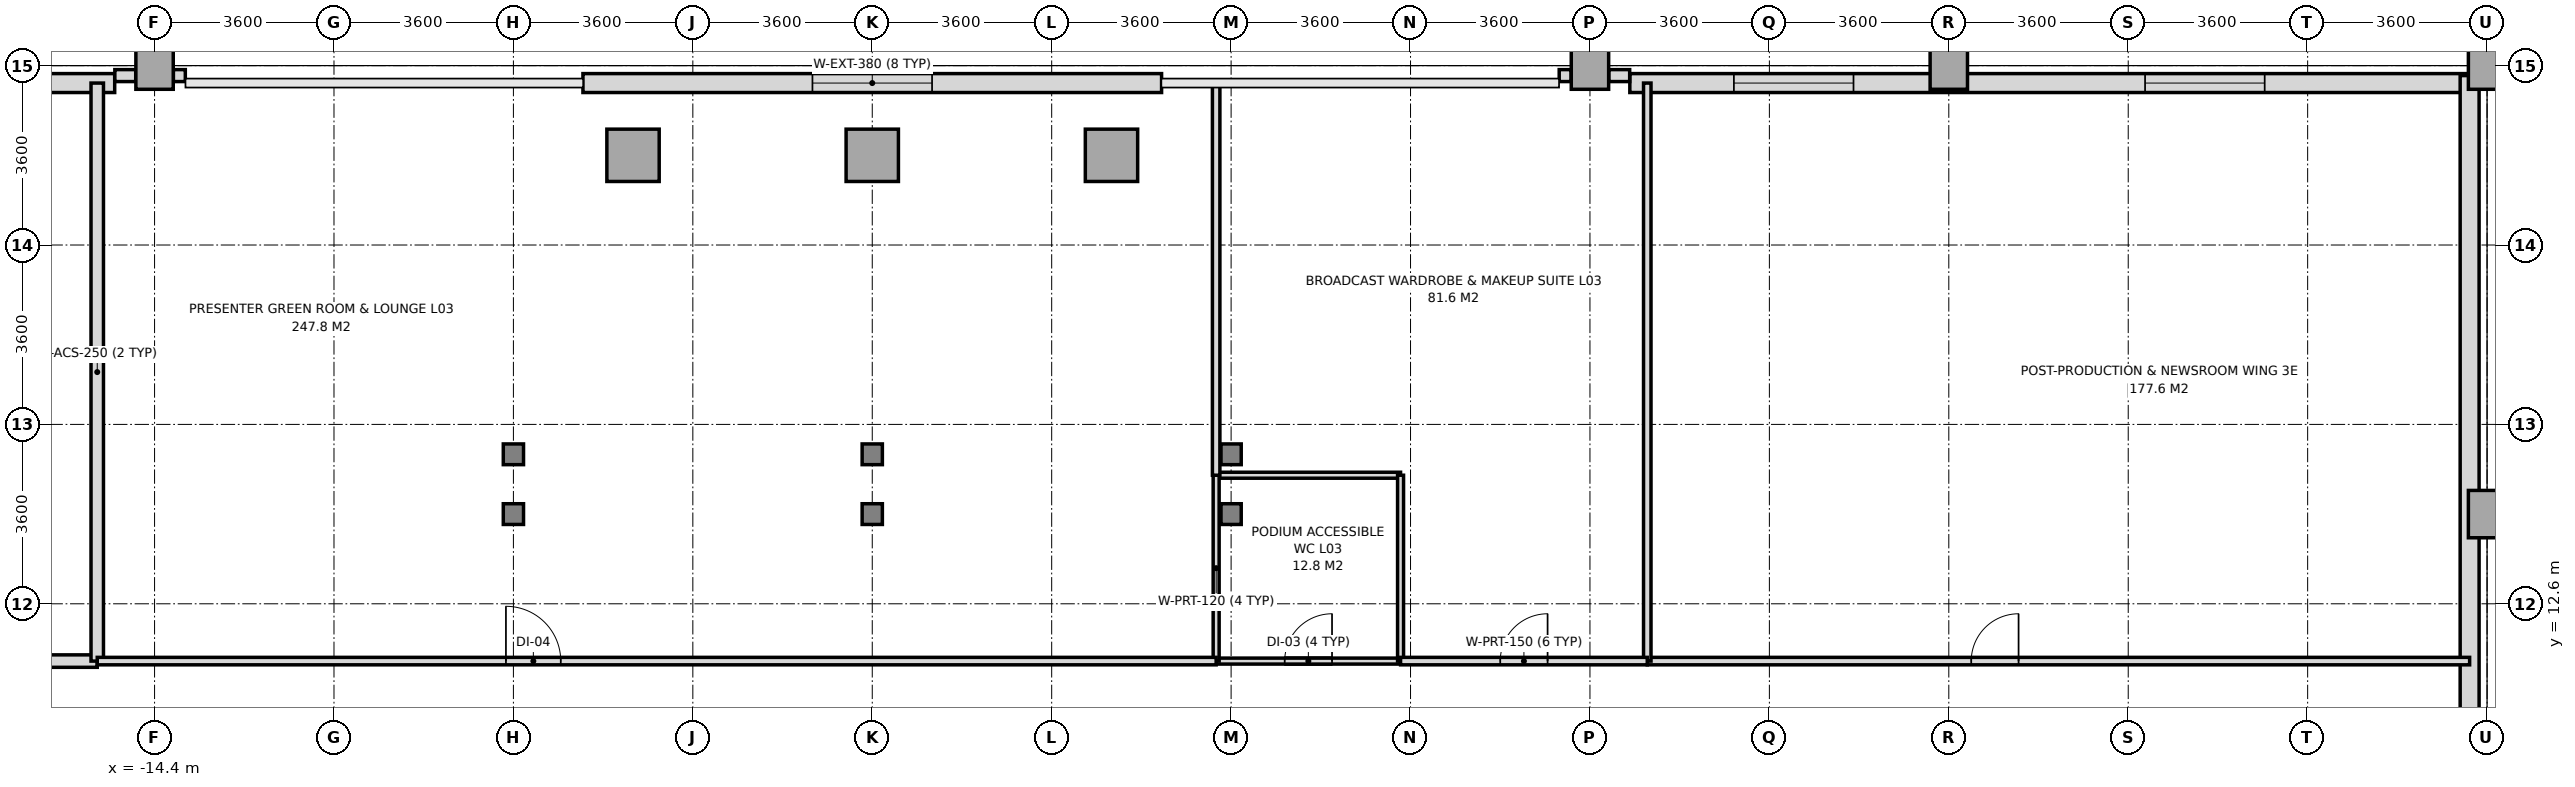
"""IFC4 building model, lengths in metres.
Left out: names, types, materials, properties, quantities, classifications, styles, units other than length and angle.
Written with IfcOpenShell. Run it as: python <this file> out.ifc"""

import sys

from ifc_helpers import new_model, si_unit, direction, frame, frame_2d, origin, origin_2d, place, context, subcontext, project, spatial, rectangle, i_section, extrude, source, transform, mapped, element, fill, save


model = new_model("IFC4")
c1 = context("Model", 3, precision=1e-05, world=origin(), true_north=direction((0.0, 1.0)))
c2 = subcontext(c1, "Body", "Model", "MODEL_VIEW")
j1 = project(units=[si_unit("LENGTHUNIT", "METRE"), si_unit("PLANEANGLEUNIT", "RADIAN")], contexts=[c1])
p1 = place(None, origin())
s1 = spatial("IfcSite", under=j1, at=p1, CompositionType="ELEMENT")
p2 = place(p1, origin())
s2 = spatial("IfcBuilding", under=s1, at=p2, CompositionType="ELEMENT")
p3 = place(p2, frame((0.0, 0.0, 15.6)))
s3 = spatial("IfcBuildingStorey", under=s2, at=p3, CompositionType="ELEMENT", Elevation=15.6)
m1 = source(origin(), c2, "Body", "SweptSolid", [
    extrude(rectangle(XDim=0.75, YDim=0.95, at=origin_2d()), origin(), (0.0, 0.0, 1.0), 4.55),
])
p4 = place(p3, frame((-14.4, 23.4, 0.0), z_axis=(0.0, 0.0, 1.0), x_axis=(1.0, 0.0, 0.0)))
e1 = element("IfcColumn", 1, at=p4, inside=s3, PredefinedType="COLUMN", context=c2, shape_type="MappedRepresentation", body=[
    mapped(m1, transform((0.0, 0.0, 0.0), x_axis=(1.0, 0.0, 0.0), y_axis=(0.0, 1.0, 0.0), z_axis=(0.0, 0.0, 1.0), scale=1.0)),
])
m2 = source(origin(), c2, "Body", "SweptSolid", [
    extrude(i_section(OverallWidth=0.406, OverallDepth=0.416, WebThickness=0.024, FlangeThickness=0.039, at=origin_2d()), origin(), (0.0, 0.0, 1.0), 4.55),
])
for number, where, z_axis, x_axis in (
    (2, (-7.2, 14.4, 0.0), (0.0, 0.0, 1.0), (1.0, 0.0, 0.0)),
    (3, (-7.2, 15.6, 0.0), (0.0, 0.0, 1.0), (1.0, 0.0, 0.0)),
):
    element("IfcColumn", number, at=place(p3, frame(where, z_axis=z_axis, x_axis=x_axis)), inside=s3, PredefinedType="COLUMN", context=c2, shape_type="MappedRepresentation", body=[
        mapped(m2, transform((0.0, 0.0, 0.0), x_axis=(1.0, 0.0, 0.0), y_axis=(0.0, 1.0, 0.0), z_axis=(0.0, 0.0, 1.0), scale=1.0)),
    ])
m3 = source(origin(), c2, "Body", "SweptSolid", [
    extrude(rectangle(XDim=1.05, YDim=1.05, at=origin_2d()), origin(), (0.0, 0.0, 1.0), 4.55),
])
p5 = place(p3, frame((-4.8, 21.6, 0.0), z_axis=(0.0, 0.0, 1.0), x_axis=(1.0, 0.0, 0.0)))
e4 = element("IfcColumn", 4, at=p5, inside=s3, PredefinedType="COLUMN", context=c2, shape_type="MappedRepresentation", body=[
    mapped(m3, transform((0.0, 0.0, 0.0), x_axis=(1.0, 0.0, 0.0), y_axis=(0.0, 1.0, 0.0), z_axis=(0.0, 0.0, 1.0), scale=1.0)),
])
for number, where, z_axis, x_axis in (
    (5, (0.0, 14.4, 0.0), (0.0, 0.0, 1.0), (1.0, 0.0, 0.0)),
    (6, (0.0, 15.6, 0.0), (0.0, 0.0, 1.0), (1.0, 0.0, 0.0)),
):
    element("IfcColumn", number, at=place(p3, frame(where, z_axis=z_axis, x_axis=x_axis)), inside=s3, PredefinedType="COLUMN", context=c2, shape_type="MappedRepresentation", body=[
        mapped(m2, transform((0.0, 0.0, 0.0), x_axis=(1.0, 0.0, 0.0), y_axis=(0.0, 1.0, 0.0), z_axis=(0.0, 0.0, 1.0), scale=1.0)),
    ])
for number, where, z_axis, x_axis in (
    (7, (0.0, 21.6, 0.0), (0.0, 0.0, 1.0), (1.0, 0.0, 0.0)),
    (8, (4.8, 21.6, 0.0), (0.0, 0.0, 1.0), (1.0, 0.0, 0.0)),
):
    element("IfcColumn", number, at=place(p3, frame(where, z_axis=z_axis, x_axis=x_axis)), inside=s3, PredefinedType="COLUMN", context=c2, shape_type="MappedRepresentation", body=[
        mapped(m3, transform((0.0, 0.0, 0.0), x_axis=(1.0, 0.0, 0.0), y_axis=(0.0, 1.0, 0.0), z_axis=(0.0, 0.0, 1.0), scale=1.0)),
    ])
for number, where, z_axis, x_axis in (
    (9, (7.2, 14.4, 0.0), (0.0, 0.0, 1.0), (1.0, 0.0, 0.0)),
    (10, (7.2, 15.6, 0.0), (0.0, 0.0, 1.0), (1.0, 0.0, 0.0)),
):
    element("IfcColumn", number, at=place(p3, frame(where, z_axis=z_axis, x_axis=x_axis)), inside=s3, PredefinedType="COLUMN", context=c2, shape_type="MappedRepresentation", body=[
        mapped(m2, transform((0.0, 0.0, 0.0), x_axis=(1.0, 0.0, 0.0), y_axis=(0.0, 1.0, 0.0), z_axis=(0.0, 0.0, 1.0), scale=1.0)),
    ])
for number, where, z_axis, x_axis in (
    (11, (14.4, 23.4, 0.0), (0.0, 0.0, 1.0), (1.0, 0.0, 0.0)),
    (12, (21.6, 23.4, 0.0), (0.0, 0.0, 1.0), (1.0, 0.0, 0.0)),
    (13, (32.4, 14.4, 0.0), (0.0, 0.0, 1.0), (1.0, 0.0, 0.0)),
    (14, (32.4, 23.4, 0.0), (0.0, 0.0, 1.0), (1.0, 0.0, 0.0)),
):
    element("IfcColumn", number, at=place(p3, frame(where, z_axis=z_axis, x_axis=x_axis)), inside=s3, PredefinedType="COLUMN", context=c2, shape_type="MappedRepresentation", body=[
        mapped(m1, transform((0.0, 0.0, 0.0), x_axis=(1.0, 0.0, 0.0), y_axis=(0.0, 1.0, 0.0), z_axis=(0.0, 0.0, 1.0), scale=1.0)),
    ])
p6 = place(p3, frame((-32.05, 23.05, 0.0), z_axis=(0.0, 0.0, 1.0), x_axis=(1.0, 0.0, 0.0)))
e15 = element("IfcWall", 15, at=p6, inside=s3, PredefinedType="SOLIDWALL", context=c2, shape_type="SweptSolid", body=[
    extrude(rectangle(XDim=16.85, YDim=0.38, at=frame_2d((8.425, 0.0))), origin(), (0.0, 0.0, 1.0), 3.8),
])
p7 = place(p6, frame((4.112, 0.0, 0.95)))
e16 = element("IfcOpeningElement", 16, at=p7, cuts=e15, PredefinedType="OPENING", context=c2, shape_type="SweptSolid", body=[
    extrude(rectangle(XDim=2.4, YDim=2.2, at=frame_2d((1.2, 1.1))), frame((0.0, 0.2, 0.0), z_axis=(0.0, -1.0, 0.0), x_axis=(1.0, 0.0, 0.0)), (0.0, 0.0, 1.0), 0.4),
])
p8 = place(p6, frame((12.362, 0.0, 0.95)))
e17 = element("IfcOpeningElement", 17, at=p8, cuts=e15, PredefinedType="OPENING", context=c2, shape_type="SweptSolid", body=[
    extrude(rectangle(XDim=2.4, YDim=2.2, at=frame_2d((1.2, 1.1))), frame((0.0, 0.2, 0.0), z_axis=(0.0, -1.0, 0.0), x_axis=(1.0, 0.0, 0.0)), (0.0, 0.0, 1.0), 0.4),
])
p9 = place(p3, frame((15.2, 23.05, 0.0), z_axis=(0.0, 0.0, 1.0), x_axis=(1.0, 0.0, 0.0)))
e18 = element("IfcWall", 18, at=p9, inside=s3, PredefinedType="SOLIDWALL", context=c2, shape_type="SweptSolid", body=[
    extrude(rectangle(XDim=16.85, YDim=0.38, at=frame_2d((8.425, 0.0))), origin(), (0.0, 0.0, 1.0), 3.8),
])
p10 = place(p9, frame((2.088, 0.0, 0.95)))
e19 = element("IfcOpeningElement", 19, at=p10, cuts=e18, PredefinedType="OPENING", context=c2, shape_type="SweptSolid", body=[
    extrude(rectangle(XDim=2.4, YDim=2.2, at=frame_2d((1.2, 1.1))), frame((0.0, 0.2, 0.0), z_axis=(0.0, -1.0, 0.0), x_axis=(1.0, 0.0, 0.0)), (0.0, 0.0, 1.0), 0.4),
])
p11 = place(p9, frame((10.338, 0.0, 0.95)))
e20 = element("IfcOpeningElement", 20, at=p11, cuts=e18, PredefinedType="OPENING", context=c2, shape_type="SweptSolid", body=[
    extrude(rectangle(XDim=2.4, YDim=2.2, at=frame_2d((1.2, 1.1))), frame((0.0, 0.2, 0.0), z_axis=(0.0, -1.0, 0.0), x_axis=(1.0, 0.0, 0.0)), (0.0, 0.0, 1.0), 0.4),
])
p12 = place(p3, frame((32.05, -18.8, 0.0), z_axis=(0.0, 0.0, 1.0), x_axis=(0.0, 1.0, 0.0)))
e21 = element("IfcWall", 21, at=p12, inside=s3, PredefinedType="SOLIDWALL", context=c2, shape_type="SweptSolid", body=[
    extrude(rectangle(XDim=42.0, YDim=0.38, at=frame_2d((21.0, 0.0))), origin(), (0.0, 0.0, 1.0), 3.8),
])
p13 = place(p12, frame((5.9, 0.0, 0.95)))
e22 = element("IfcOpeningElement", 22, at=p13, cuts=e21, PredefinedType="OPENING", context=c2, shape_type="SweptSolid", body=[
    extrude(rectangle(XDim=2.4, YDim=2.2, at=frame_2d((1.2, 1.1))), frame((0.0, 0.2, 0.0), z_axis=(0.0, -1.0, 0.0), x_axis=(1.0, 0.0, 0.0)), (0.0, 0.0, 1.0), 0.4),
])
p14 = place(p12, frame((13.1, 0.0, 0.95)))
e23 = element("IfcOpeningElement", 23, at=p14, cuts=e21, PredefinedType="OPENING", context=c2, shape_type="SweptSolid", body=[
    extrude(rectangle(XDim=2.4, YDim=2.2, at=frame_2d((1.2, 1.1))), frame((0.0, 0.2, 0.0), z_axis=(0.0, -1.0, 0.0), x_axis=(1.0, 0.0, 0.0)), (0.0, 0.0, 1.0), 0.4),
])
p15 = place(p12, frame((22.1, 0.0, 0.95)))
e24 = element("IfcOpeningElement", 24, at=p15, cuts=e21, PredefinedType="OPENING", context=c2, shape_type="SweptSolid", body=[
    extrude(rectangle(XDim=2.4, YDim=2.2, at=frame_2d((1.2, 1.1))), frame((0.0, 0.2, 0.0), z_axis=(0.0, -1.0, 0.0), x_axis=(1.0, 0.0, 0.0)), (0.0, 0.0, 1.0), 0.4),
])
p16 = place(p3, frame((-5.805, 23.05, 0.0), z_axis=(0.0, 0.0, 1.0), x_axis=(1.0, 0.0, 0.0)))
e25 = element("IfcWall", 25, at=p16, inside=s3, PredefinedType="SOLIDWALL", context=c2, shape_type="SweptSolid", body=[
    extrude(rectangle(XDim=11.61, YDim=0.38, at=frame_2d((5.805, 0.0))), origin(), (0.0, 0.0, 1.0), 4.55),
])
p17 = place(p16, frame((4.605, 0.0, 0.95)))
e26 = element("IfcOpeningElement", 26, at=p17, cuts=e25, PredefinedType="OPENING", context=c2, shape_type="SweptSolid", body=[
    extrude(rectangle(XDim=2.4, YDim=2.2, at=frame_2d((1.2, 1.1))), frame((0.0, 0.2, 0.0), z_axis=(0.0, -1.0, 0.0), x_axis=(1.0, 0.0, 0.0)), (0.0, 0.0, 1.0), 0.4),
])
p18 = place(p3, frame((-15.197, 23.2, 0.0), z_axis=(0.0, 0.0, 1.0), x_axis=(1.0, 0.0, 0.0)))
e27 = element("IfcWall", 27, at=p18, inside=s3, PredefinedType="PARAPET", context=c2, shape_type="SweptSolid", body=[
    extrude(rectangle(XDim=0.419, YDim=0.24, at=frame_2d((0.209, 0.0))), origin(), (0.0, 0.0, 1.0), 1.15),
])
for number, where, z_axis, x_axis in (
    (28, (-14.022, 23.2, 0.0), (0.0, 0.0, 1.0), (1.0, 0.0, 0.0)),
    (29, (13.783, 23.2, 0.0), (0.0, 0.0, 1.0), (1.0, 0.0, 0.0)),
):
    element("IfcWall", number, at=place(p3, frame(where, z_axis=z_axis, x_axis=x_axis)), inside=s3, PredefinedType="PARAPET", context=c2, shape_type="SweptSolid", body=[
        extrude(rectangle(XDim=0.239, YDim=0.24, at=frame_2d((0.12, 0.0))), origin(), (0.0, 0.0, 1.0), 1.15),
    ])
p19 = place(p3, frame((14.778, 23.2, 0.0), z_axis=(0.0, 0.0, 1.0), x_axis=(1.0, 0.0, 0.0)))
e30 = element("IfcWall", 30, at=p19, inside=s3, PredefinedType="PARAPET", context=c2, shape_type="SweptSolid", body=[
    extrude(rectangle(XDim=0.419, YDim=0.24, at=frame_2d((0.209, 0.0))), origin(), (0.0, 0.0, 1.0), 1.15),
])
p20 = place(p3, frame((6.9, 11.45, 0.0), z_axis=(0.0, 0.0, 1.0), x_axis=(1.0, 0.0, 0.0)))
e31 = element("IfcWall", 31, at=p20, inside=s3, PredefinedType="PARTITIONING", context=c2, shape_type="SweptSolid", body=[
    extrude(rectangle(XDim=3.7, YDim=0.12, at=frame_2d((1.85, 0.0))), origin(), (0.0, 0.0, 1.0), 4.55),
])
p21 = place(p20, frame((1.375, 0.0, 0.0)))
e32 = element("IfcOpeningElement", 32, at=p21, cuts=e31, PredefinedType="OPENING", context=c2, shape_type="SweptSolid", body=[
    extrude(rectangle(XDim=0.95, YDim=2.15, at=frame_2d((0.475, 1.075))), frame((0.0, 0.07, 0.0), z_axis=(0.0, -1.0, 0.0), x_axis=(1.0, 0.0, 0.0)), (0.0, 0.0, 1.0), 0.14),
])
p22 = place(p3, frame((6.9, 15.18, 0.0), z_axis=(0.0, 0.0, 1.0), x_axis=(1.0, 0.0, 0.0)))
e33 = element("IfcWall", 33, at=p22, inside=s3, PredefinedType="PARTITIONING", context=c2, shape_type="SweptSolid", body=[
    extrude(rectangle(XDim=3.7, YDim=0.12, at=frame_2d((1.85, 0.0))), origin(), (0.0, 0.0, 1.0), 3.2),
])
p23 = place(p3, frame((6.9, 11.45, 0.0), z_axis=(0.0, 0.0, 1.0), x_axis=(0.0, 1.0, 0.0)))
e34 = element("IfcWall", 34, at=p23, inside=s3, PredefinedType="PARTITIONING", context=c2, shape_type="SweptSolid", body=[
    extrude(rectangle(XDim=3.73, YDim=0.12, at=frame_2d((1.865, 0.0))), origin(), (0.0, 0.0, 1.0), 3.2),
])
p24 = place(p3, frame((10.6, 11.45, 0.0), z_axis=(0.0, 0.0, 1.0), x_axis=(0.0, 1.0, 0.0)))
e35 = element("IfcWall", 35, at=p24, inside=s3, PredefinedType="PARTITIONING", context=c2, shape_type="SweptSolid", body=[
    extrude(rectangle(XDim=3.73, YDim=0.12, at=frame_2d((1.865, 0.0))), origin(), (0.0, 0.0, 1.0), 4.55),
])
p25 = place(p3, frame((-32.05, 11.45, 0.0), z_axis=(0.0, 0.0, 1.0), x_axis=(1.0, 0.0, 0.0)))
e36 = element("IfcWall", 36, at=p25, inside=s3, PredefinedType="SOLIDWALL", context=c2, shape_type="SweptSolid", body=[
    extrude(rectangle(XDim=16.5, YDim=0.25, at=frame_2d((8.25, 0.0))), origin(), (0.0, 0.0, 1.0), 4.55),
])
p26 = place(p25, frame((6.5, 0.0, 0.0)))
e37 = element("IfcOpeningElement", 37, at=p26, cuts=e36, PredefinedType="OPENING", context=c2, shape_type="SweptSolid", body=[
    extrude(rectangle(XDim=0.95, YDim=2.15, at=frame_2d((0.475, 1.075))), frame((0.0, 0.135, 0.0), z_axis=(0.0, -1.0, 0.0), x_axis=(1.0, 0.0, 0.0)), (0.0, 0.0, 1.0), 0.27),
])
p27 = place(p3, frame((-15.55, 11.45, 0.0), z_axis=(0.0, 0.0, 1.0), x_axis=(0.0, 1.0, 0.0)))
e38 = element("IfcWall", 38, at=p27, inside=s3, PredefinedType="SOLIDWALL", context=c2, shape_type="SweptSolid", body=[
    extrude(rectangle(XDim=11.6, YDim=0.25, at=frame_2d((5.8, 0.0))), origin(), (0.0, 0.0, 1.0), 4.55),
])
p28 = place(p3, frame((15.55, 11.45, 0.0), z_axis=(0.0, 0.0, 1.0), x_axis=(1.0, 0.0, 0.0)))
e39 = element("IfcWall", 39, at=p28, inside=s3, PredefinedType="PARTITIONING", context=c2, shape_type="SweptSolid", body=[
    extrude(rectangle(XDim=16.5, YDim=0.15, at=frame_2d((8.25, 0.0))), origin(), (0.0, 0.0, 1.0), 4.55),
])
p29 = place(p28, frame((6.5, 0.0, 0.0)))
e40 = element("IfcOpeningElement", 40, at=p29, cuts=e39, PredefinedType="OPENING", context=c2, shape_type="SweptSolid", body=[
    extrude(rectangle(XDim=0.95, YDim=2.15, at=frame_2d((0.475, 1.075))), frame((0.0, 0.085, 0.0), z_axis=(0.0, -1.0, 0.0), x_axis=(1.0, 0.0, 0.0)), (0.0, 0.0, 1.0), 0.17),
])
p30 = place(p3, frame((15.55, 11.45, 0.0), z_axis=(0.0, 0.0, 1.0), x_axis=(0.0, 1.0, 0.0)))
e41 = element("IfcWall", 41, at=p30, inside=s3, PredefinedType="PARTITIONING", context=c2, shape_type="SweptSolid", body=[
    extrude(rectangle(XDim=11.6, YDim=0.15, at=frame_2d((5.8, 0.0))), origin(), (0.0, 0.0, 1.0), 4.55),
])
p31 = place(p3, frame((-15.55, 11.45, 0.0), z_axis=(0.0, 0.0, 1.0), x_axis=(1.0, 0.0, 0.0)))
e42 = element("IfcWall", 42, at=p31, inside=s3, PredefinedType="PARTITIONING", context=c2, shape_type="SweptSolid", body=[
    extrude(rectangle(XDim=22.45, YDim=0.15, at=frame_2d((11.225, 0.0))), origin(), (0.0, 0.0, 1.0), 3.95),
])
p32 = place(p31, frame((8.2, 0.0, 0.0)))
e43 = element("IfcOpeningElement", 43, at=p32, cuts=e42, PredefinedType="OPENING", context=c2, shape_type="SweptSolid", body=[
    extrude(rectangle(XDim=1.1, YDim=2.2, at=frame_2d((0.55, 1.1))), frame((0.0, 0.085, 0.0), z_axis=(0.0, -1.0, 0.0), x_axis=(1.0, 0.0, 0.0)), (0.0, 0.0, 1.0), 0.17),
])
p33 = place(p3, frame((6.9, 15.18, 0.0), z_axis=(0.0, 0.0, 1.0), x_axis=(0.0, 1.0, 0.0)))
e44 = element("IfcWall", 44, at=p33, inside=s3, PredefinedType="PARTITIONING", context=c2, shape_type="SweptSolid", body=[
    extrude(rectangle(XDim=7.87, YDim=0.15, at=frame_2d((3.935, 0.0))), origin(), (0.0, 0.0, 1.0), 3.2),
])
p34 = place(p3, frame((10.6, 11.45, 0.0), z_axis=(0.0, 0.0, 1.0), x_axis=(1.0, 0.0, 0.0)))
e45 = element("IfcWall", 45, at=p34, inside=s3, PredefinedType="PARTITIONING", context=c2, shape_type="SweptSolid", body=[
    extrude(rectangle(XDim=4.95, YDim=0.15, at=frame_2d((2.475, 0.0))), origin(), (0.0, 0.0, 1.0), 3.95),
])
p35 = place(p34, frame((2.0, 0.0, 0.0)))
e46 = element("IfcOpeningElement", 46, at=p35, cuts=e45, PredefinedType="OPENING", context=c2, shape_type="SweptSolid", body=[
    extrude(rectangle(XDim=0.95, YDim=2.15, at=frame_2d((0.475, 1.075))), frame((0.0, 0.085, 0.0), z_axis=(0.0, -1.0, 0.0), x_axis=(1.0, 0.0, 0.0)), (0.0, 0.0, 1.0), 0.17),
])
m4 = source(origin(), c2, "Body", "SweptSolid", [
    extrude(rectangle(XDim=2.4, YDim=2.2, at=frame_2d((1.2, 1.1))), frame((0.0, 0.03, 0.0), z_axis=(0.0, -1.0, 0.0), x_axis=(1.0, 0.0, 0.0)), (0.0, 0.0, 1.0), 0.06),
])
p36 = place(p10, origin())
e47 = element("IfcWindow", 47, at=p36, inside=s3, PartitioningType="SINGLE_PANEL", PredefinedType="WINDOW", context=c2, shape_type="MappedRepresentation", body=[
    mapped(m4, transform((0.0, 0.0, 0.0), x_axis=(1.0, 0.0, 0.0), y_axis=(0.0, 1.0, 0.0), z_axis=(0.0, 0.0, 1.0), scale=1.0)),
])
fill(e19, e47)
p37 = place(p11, origin())
e48 = element("IfcWindow", 48, at=p37, inside=s3, PartitioningType="SINGLE_PANEL", PredefinedType="WINDOW", context=c2, shape_type="MappedRepresentation", body=[
    mapped(m4, transform((0.0, 0.0, 0.0), x_axis=(1.0, 0.0, 0.0), y_axis=(0.0, 1.0, 0.0), z_axis=(0.0, 0.0, 1.0), scale=1.0)),
])
fill(e20, e48)
p38 = place(p17, origin())
e49 = element("IfcWindow", 49, at=p38, inside=s3, PartitioningType="SINGLE_PANEL", PredefinedType="WINDOW", context=c2, shape_type="MappedRepresentation", body=[
    mapped(m4, transform((0.0, 0.0, 0.0), x_axis=(1.0, 0.0, 0.0), y_axis=(0.0, 1.0, 0.0), z_axis=(0.0, 0.0, 1.0), scale=1.0)),
])
fill(e26, e49)
m5 = source(origin(), c2, "Body", "SweptSolid", [
    extrude(rectangle(XDim=0.95, YDim=2.15, at=frame_2d((0.475, 1.075))), frame((0.0, 0.025, 0.0), z_axis=(0.0, -1.0, 0.0), x_axis=(1.0, 0.0, 0.0)), (0.0, 0.0, 1.0), 0.05),
])
p39 = place(p21, origin())
e50 = element("IfcDoor", 50, at=p39, inside=s3, OperationType="SINGLE_SWING_RIGHT", PredefinedType="DOOR", context=c2, shape_type="MappedRepresentation", body=[
    mapped(m5, transform((0.0, 0.0, 0.0), x_axis=(1.0, 0.0, 0.0), y_axis=(0.0, 1.0, 0.0), z_axis=(0.0, 0.0, 1.0), scale=1.0)),
])
fill(e32, e50)
p40 = place(p29, origin())
e51 = element("IfcDoor", 51, at=p40, inside=s3, OperationType="SINGLE_SWING_RIGHT", PredefinedType="DOOR", context=c2, shape_type="MappedRepresentation", body=[
    mapped(m5, transform((0.0, 0.0, 0.0), x_axis=(1.0, 0.0, 0.0), y_axis=(0.0, 1.0, 0.0), z_axis=(0.0, 0.0, 1.0), scale=1.0)),
])
fill(e40, e51)
m6 = source(origin(), c2, "Body", "SweptSolid", [
    extrude(rectangle(XDim=1.1, YDim=2.2, at=frame_2d((0.55, 1.1))), frame((0.0, 0.025, 0.0), z_axis=(0.0, -1.0, 0.0), x_axis=(1.0, 0.0, 0.0)), (0.0, 0.0, 1.0), 0.05),
])
p41 = place(p32, origin())
e52 = element("IfcDoor", 52, at=p41, inside=s3, OperationType="SINGLE_SWING_LEFT", PredefinedType="DOOR", context=c2, shape_type="MappedRepresentation", body=[
    mapped(m6, transform((0.0, 0.0, 0.0), x_axis=(1.0, 0.0, 0.0), y_axis=(0.0, 1.0, 0.0), z_axis=(0.0, 0.0, 1.0), scale=1.0)),
])
fill(e43, e52)
p42 = place(p35, origin())
e53 = element("IfcDoor", 53, at=p42, inside=s3, OperationType="SINGLE_SWING_RIGHT", PredefinedType="DOOR", context=c2, shape_type="MappedRepresentation", body=[
    mapped(m5, transform((0.0, 0.0, 0.0), x_axis=(1.0, 0.0, 0.0), y_axis=(0.0, 1.0, 0.0), z_axis=(0.0, 0.0, 1.0), scale=1.0)),
])
fill(e46, e53)
save(model, sys.argv[1])
